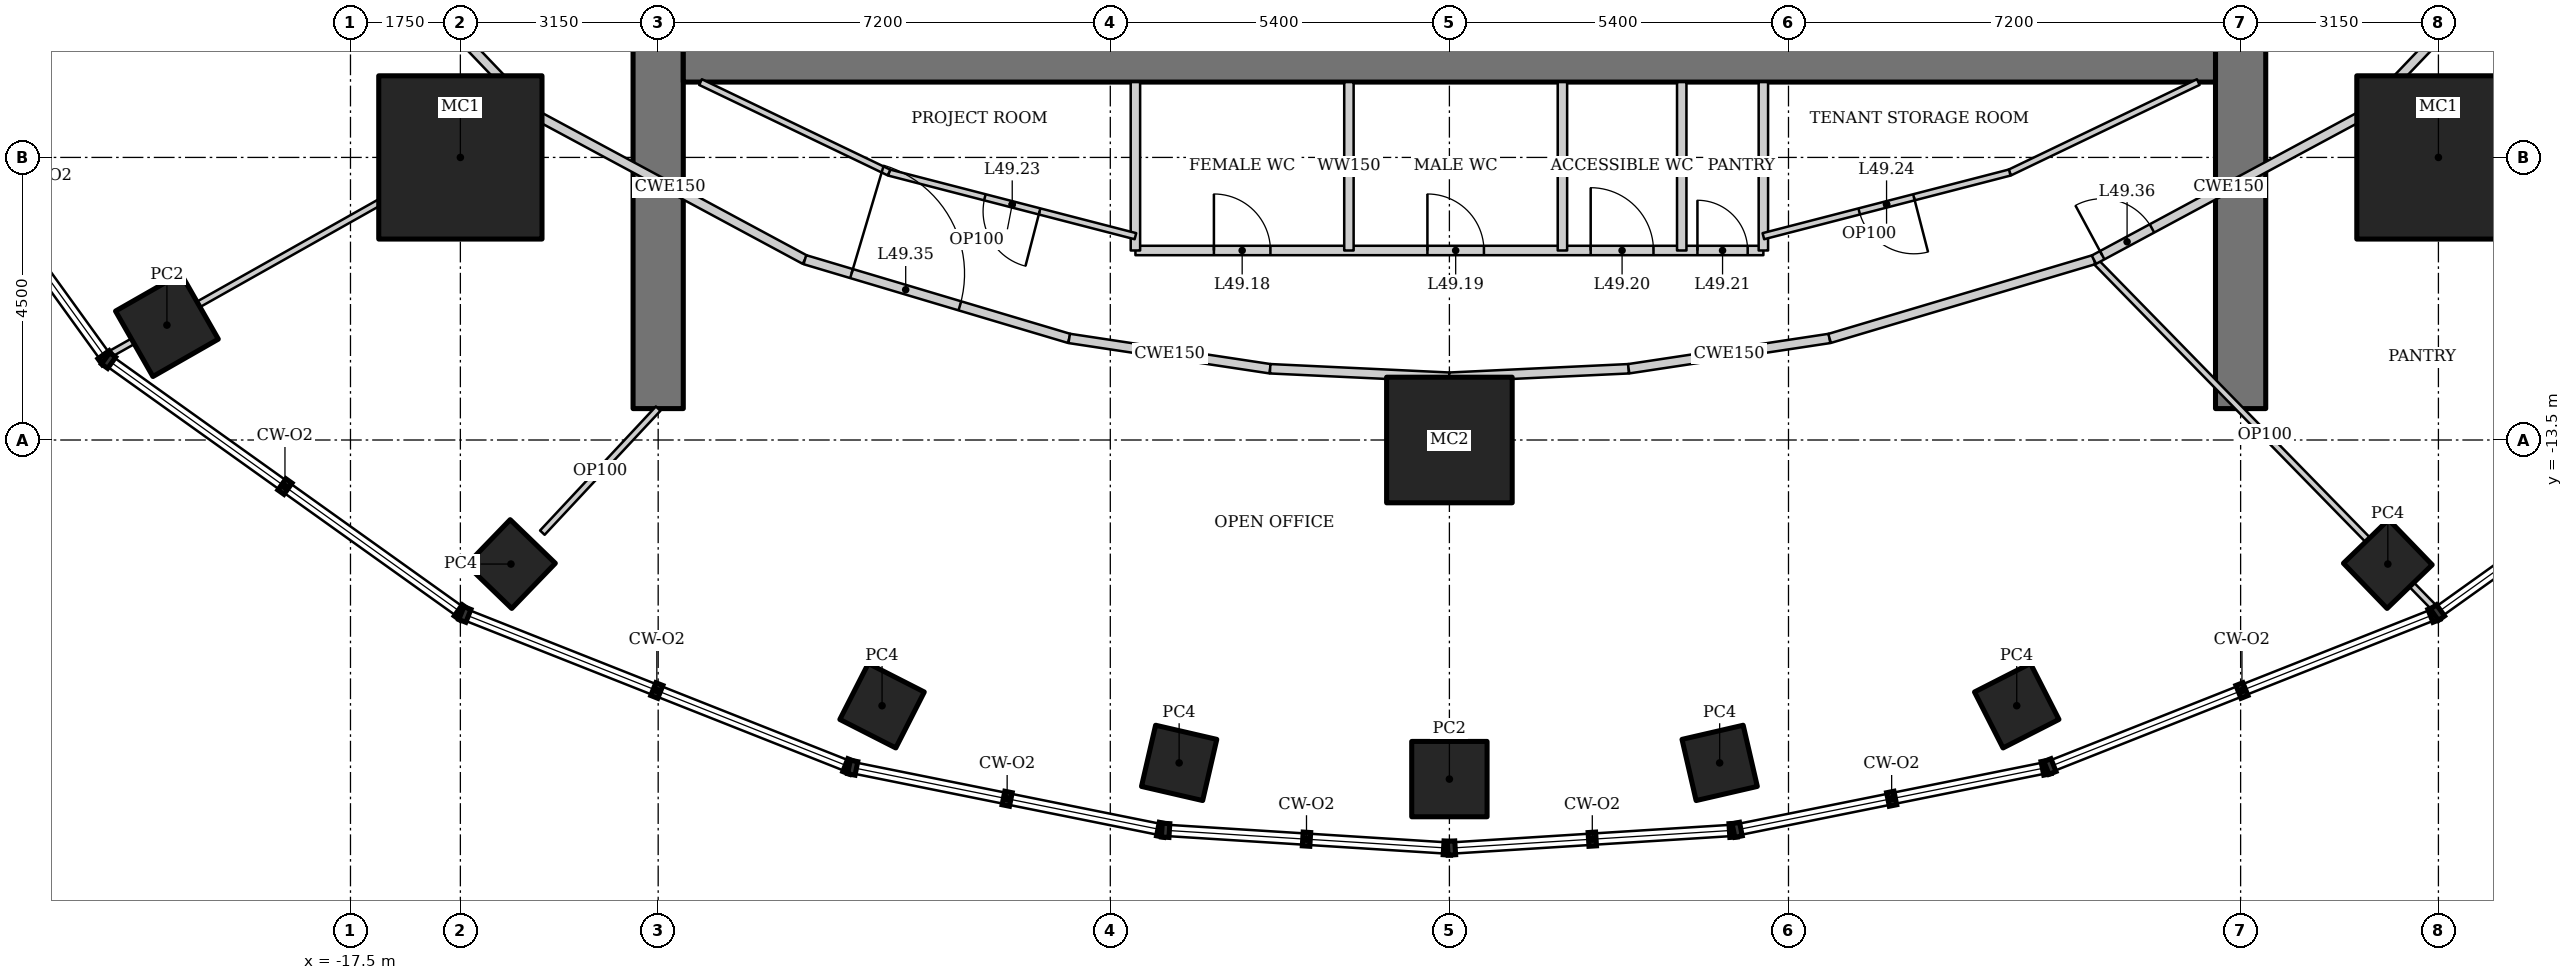
"""IFC4 building model, lengths in metres.
Left out: names, types, materials, properties, quantities, classifications, styles, units other than length and angle.
Written with IfcOpenShell. Run it as: python <this file> out.ifc"""

import sys

from ifc_helpers import new_model, si_unit, direction, frame, frame_2d, origin, origin_2d, place, context, subcontext, project, spatial, rectangle, hollow_rectangle, extrude, element, fill, save


model = new_model("IFC4")
c1 = context("Model", 3, precision=1e-05, world=origin(), true_north=direction((0.0, 1.0)))
c2 = subcontext(c1, "Body", "Model", "MODEL_VIEW")
j1 = project(units=[si_unit("LENGTHUNIT", "METRE"), si_unit("PLANEANGLEUNIT", "RADIAN")], contexts=[c1])
p1 = place(None, origin())
s1 = spatial("IfcSite", under=j1, at=p1, CompositionType="ELEMENT")
p2 = place(p1, origin())
s2 = spatial("IfcBuilding", under=s1, at=p2, CompositionType="ELEMENT")
p3 = place(p2, frame((0.0, 0.0, 211.6)))
s3 = spatial("IfcBuildingStorey", under=s2, at=p3, CompositionType="ELEMENT", Elevation=211.6)
p4 = place(p3, frame((-15.75, -9.0, 0.0), z_axis=(0.0, 0.0, 1.0), x_axis=(1.0, 0.0, 0.0)))
e1 = element("IfcColumn", 1, at=p4, inside=s3, PredefinedType="COLUMN", context=c2, shape_type="SweptSolid", body=[
    extrude(hollow_rectangle(XDim=2.6, YDim=2.6, WallThickness=0.13, at=origin_2d()), origin(), (0.0, 0.0, 1.0), 4.2),
])
p5 = place(p3, frame((0.0, -13.5, 0.0), z_axis=(0.0, 0.0, 1.0), x_axis=(1.0, 0.0, 0.0)))
e2 = element("IfcColumn", 2, at=p5, inside=s3, PredefinedType="COLUMN", context=c2, shape_type="SweptSolid", body=[
    extrude(hollow_rectangle(XDim=2.0, YDim=2.0, WallThickness=0.17, at=origin_2d()), origin(), (0.0, 0.0, 1.0), 4.2),
])
p6 = place(p3, frame((15.75, -9.0, 0.0), z_axis=(0.0, 0.0, 1.0), x_axis=(1.0, 0.0, 0.0)))
e3 = element("IfcColumn", 3, at=p6, inside=s3, PredefinedType="COLUMN", context=c2, shape_type="SweptSolid", body=[
    extrude(hollow_rectangle(XDim=2.6, YDim=2.6, WallThickness=0.13, at=origin_2d()), origin(), (0.0, 0.0, 1.0), 4.2),
])
p7 = place(p3, frame((-20.423, -11.67, 0.0), z_axis=(0.0, 0.0, 1.0), x_axis=(0.86824298017, 0.496139221777, 0.0)))
e4 = element("IfcColumn", 4, at=p7, inside=s3, PredefinedType="COLUMN", context=c2, shape_type="SweptSolid", body=[
    extrude(hollow_rectangle(XDim=1.2, YDim=1.2, WallThickness=0.1, at=origin_2d()), origin(), (0.0, 0.0, 1.0), 4.2),
])
for number, where, z_axis, x_axis in (
    (5, (-14.944, -15.475, 0.0), (0.0, 0.0, 1.0), (0.695, 0.719, 0.0)),
    (6, (-9.035, -17.731, 0.0), (0.0, 0.0, 1.0), (0.454, 0.891, 0.0)),
    (7, (-4.304, -18.642, 0.0), (0.0, 0.0, 1.0), (0.225, 0.974, 0.0)),
):
    element("IfcColumn", number, at=place(p3, frame(where, z_axis=z_axis, x_axis=x_axis)), inside=s3, PredefinedType="COLUMN", context=c2, shape_type="SweptSolid", body=[
        extrude(hollow_rectangle(XDim=1.0, YDim=1.0, WallThickness=0.08, at=origin_2d()), origin(), (0.0, 0.0, 1.0), 4.2),
    ])
p8 = place(p3, frame((0.0, -18.9, 0.0), z_axis=(0.0, 0.0, 1.0), x_axis=(1.0, 0.0, 0.0)))
e8 = element("IfcColumn", 8, at=p8, inside=s3, PredefinedType="COLUMN", context=c2, shape_type="SweptSolid", body=[
    extrude(hollow_rectangle(XDim=1.2, YDim=1.2, WallThickness=0.1, at=origin_2d()), origin(), (0.0, 0.0, 1.0), 4.2),
])
for number, where, z_axis, x_axis in (
    (9, (4.304, -18.642, 0.0), (0.0, 0.0, 1.0), (0.974, 0.225, 0.0)),
    (10, (9.035, -17.731, 0.0), (0.0, 0.0, 1.0), (0.891, 0.454, 0.0)),
    (11, (14.944, -15.475, 0.0), (0.0, 0.0, 1.0), (0.719, 0.695, 0.0)),
):
    element("IfcColumn", number, at=place(p3, frame(where, z_axis=z_axis, x_axis=x_axis)), inside=s3, PredefinedType="COLUMN", context=c2, shape_type="SweptSolid", body=[
        extrude(hollow_rectangle(XDim=1.0, YDim=1.0, WallThickness=0.08, at=origin_2d()), origin(), (0.0, 0.0, 1.0), 4.2),
    ])
p9 = place(p3, frame((12.6, -13.0, 0.0), z_axis=(0.0, 0.0, 1.0), x_axis=(0.0, 1.0, 0.0)))
e12 = element("IfcWall", 12, at=p9, inside=s3, PredefinedType="SHEAR", context=c2, shape_type="SweptSolid", body=[
    extrude(rectangle(XDim=26.0, YDim=0.8, at=frame_2d((13.0, 0.0))), origin(), (0.0, 0.0, 1.0), 4.2),
])
p10 = place(p9, frame((12.1, 0.0, 0.0)))
e13 = element("IfcOpeningElement", 13, at=p10, cuts=e12, PredefinedType="OPENING", context=c2, shape_type="SweptSolid", body=[
    extrude(rectangle(XDim=1.8, YDim=2.1, at=frame_2d((0.9, 1.05))), frame((0.0, 0.41, 0.0), z_axis=(0.0, -1.0, 0.0), x_axis=(1.0, 0.0, 0.0)), (0.0, 0.0, 1.0), 0.82),
])
p11 = place(p3, frame((-12.6, 13.0, 0.0), z_axis=(0.0, 0.0, 1.0), x_axis=(0.0, -1.0, 0.0)))
e14 = element("IfcWall", 14, at=p11, inside=s3, PredefinedType="SHEAR", context=c2, shape_type="SweptSolid", body=[
    extrude(rectangle(XDim=26.0, YDim=0.8, at=frame_2d((13.0, 0.0))), origin(), (0.0, 0.0, 1.0), 4.2),
])
p12 = place(p11, frame((12.1, 0.0, 0.0)))
e15 = element("IfcOpeningElement", 15, at=p12, cuts=e14, PredefinedType="OPENING", context=c2, shape_type="SweptSolid", body=[
    extrude(rectangle(XDim=1.8, YDim=2.1, at=frame_2d((0.9, 1.05))), frame((0.0, 0.41, 0.0), z_axis=(0.0, -1.0, 0.0), x_axis=(1.0, 0.0, 0.0)), (0.0, 0.0, 1.0), 0.82),
])
p13 = place(p3, frame((-12.2, -7.3, 0.0), z_axis=(0.0, 0.0, 1.0), x_axis=(1.0, 0.0, 0.0)))
e16 = element("IfcWall", 16, at=p13, inside=s3, PredefinedType="SHEAR", context=c2, shape_type="SweptSolid", body=[
    extrude(rectangle(XDim=24.4, YDim=1.0, at=frame_2d((12.2, 0.0))), origin(), (0.0, 0.0, 1.0), 4.2),
])
p14 = place(p3, frame((-21.358, -12.15, 0.0), z_axis=(0.0, 0.0, 1.0), x_axis=(0.871273053995, 0.490798599614, 0.0)))
e17 = element("IfcWall", 17, at=p14, inside=s3, PredefinedType="PARTITIONING", context=c2, shape_type="SweptSolid", body=[
    extrude(rectangle(XDim=7.807, YDim=0.1, at=frame_2d((3.904, 0.0))), origin(), (0.0, 0.0, 1.0), 3.524),
])
p15 = place(p3, frame((15.709, -16.199, 0.0), z_axis=(0.0, 0.0, 1.0), x_axis=(-0.699053895446, 0.715068983569, 0.0)))
e18 = element("IfcWall", 18, at=p15, inside=s3, PredefinedType="PARTITIONING", context=c2, shape_type="SweptSolid", body=[
    extrude(rectangle(XDim=7.79, YDim=0.1, at=frame_2d((3.895, 0.0))), origin(), (0.0, 0.0, 1.0), 3.41),
])
p16 = place(p3, frame((21.358, -12.15, 0.0), z_axis=(0.0, 0.0, 1.0), x_axis=(-0.871273053995, 0.490798599614, 0.0)))
e19 = element("IfcWall", 19, at=p16, inside=s3, PredefinedType="PARTITIONING", context=c2, shape_type="SweptSolid", body=[
    extrude(rectangle(XDim=7.807, YDim=0.1, at=frame_2d((3.904, 0.0))), origin(), (0.0, 0.0, 1.0), 3.521),
])
p17 = place(p3, frame((-18.174, -4.531, 0.0), z_axis=(0.0, 0.0, 1.0), x_axis=(0.690768413292, -0.723076067366, 0.0)))
e20 = element("IfcWall", 20, at=p17, inside=s3, PredefinedType="PARTITIONING", context=c2, shape_type="SweptSolid", body=[
    extrude(rectangle(XDim=5.237, YDim=0.15, at=frame_2d((2.618, 0.0))), origin(), (0.0, 0.0, 1.0), 4.05),
])
p18 = place(p17, frame((0.1, 0.0, 0.0)))
e21 = element("IfcOpeningElement", 21, at=p18, cuts=e20, PredefinedType="OPENING", context=c2, shape_type="SweptSolid", body=[
    extrude(rectangle(XDim=1.8, YDim=2.1, at=frame_2d((0.9, 1.05))), frame((0.0, 0.085, 0.0), z_axis=(0.0, -1.0, 0.0), x_axis=(1.0, 0.0, 0.0)), (0.0, 0.0, 1.0), 0.17),
])
p19 = place(p3, frame((-14.556, -8.318, 0.0), z_axis=(0.0, 0.0, 1.0), x_axis=(0.88053863253, -0.47397438393, 0.0)))
e22 = element("IfcWall", 22, at=p19, inside=s3, PredefinedType="PARTITIONING", context=c2, shape_type="SweptSolid", body=[
    extrude(rectangle(XDim=4.875, YDim=0.15, at=frame_2d((2.438, 0.0))), origin(), (0.0, 0.0, 1.0), 4.05),
])
p20 = place(p3, frame((-10.264, -10.628, 0.0), z_axis=(0.0, 0.0, 1.0), x_axis=(0.958384389306, -0.285480931648, 0.0)))
e23 = element("IfcWall", 23, at=p20, inside=s3, PredefinedType="PARTITIONING", context=c2, shape_type="SweptSolid", body=[
    extrude(rectangle(XDim=4.392, YDim=0.15, at=frame_2d((2.196, 0.0))), origin(), (0.0, 0.0, 1.0), 4.05),
])
p21 = place(p20, frame((0.775, 0.0, 0.0)))
e24 = element("IfcOpeningElement", 24, at=p21, cuts=e23, PredefinedType="OPENING", context=c2, shape_type="SweptSolid", body=[
    extrude(rectangle(XDim=1.8, YDim=2.1, at=frame_2d((0.9, 1.05))), frame((0.0, 0.085, 0.0), z_axis=(0.0, -1.0, 0.0), x_axis=(1.0, 0.0, 0.0)), (0.0, 0.0, 1.0), 0.17),
])
p22 = place(p3, frame((-6.054, -11.882, 0.0), z_axis=(0.0, 0.0, 1.0), x_axis=(0.988800347251, -0.149244340852, 0.0)))
e25 = element("IfcWall", 25, at=p22, inside=s3, PredefinedType="PARTITIONING", context=c2, shape_type="SweptSolid", body=[
    extrude(rectangle(XDim=3.236, YDim=0.15, at=frame_2d((1.618, 0.0))), origin(), (0.0, 0.0, 1.0), 4.05),
])
for number, where, z_axis, x_axis in (
    (26, (-2.855, -12.365, 0.0), (0.0, 0.0, 1.0), (0.999, -0.047, 0.0)),
    (27, (0.0, -12.5, 0.0), (0.0, 0.0, 1.0), (0.999, 0.047, 0.0)),
):
    element("IfcWall", number, at=place(p3, frame(where, z_axis=z_axis, x_axis=x_axis)), inside=s3, PredefinedType="PARTITIONING", context=c2, shape_type="SweptSolid", body=[
        extrude(rectangle(XDim=2.858, YDim=0.15, at=frame_2d((1.429, 0.0))), origin(), (0.0, 0.0, 1.0), 4.05),
    ])
p23 = place(p3, frame((2.855, -12.365, 0.0), z_axis=(0.0, 0.0, 1.0), x_axis=(0.988800347251, 0.149244340852, 0.0)))
e28 = element("IfcWall", 28, at=p23, inside=s3, PredefinedType="PARTITIONING", context=c2, shape_type="SweptSolid", body=[
    extrude(rectangle(XDim=3.236, YDim=0.15, at=frame_2d((1.618, 0.0))), origin(), (0.0, 0.0, 1.0), 4.05),
])
p24 = place(p3, frame((6.054, -11.882, 0.0), z_axis=(0.0, 0.0, 1.0), x_axis=(0.958384389306, 0.285480931648, 0.0)))
e29 = element("IfcWall", 29, at=p24, inside=s3, PredefinedType="PARTITIONING", context=c2, shape_type="SweptSolid", body=[
    extrude(rectangle(XDim=4.392, YDim=0.15, at=frame_2d((2.196, 0.0))), origin(), (0.0, 0.0, 1.0), 4.05),
])
p25 = place(p3, frame((10.264, -10.628, 0.0), z_axis=(0.0, 0.0, 1.0), x_axis=(0.88053863253, 0.47397438393, 0.0)))
e30 = element("IfcWall", 30, at=p25, inside=s3, PredefinedType="PARTITIONING", context=c2, shape_type="SweptSolid", body=[
    extrude(rectangle(XDim=4.875, YDim=0.15, at=frame_2d((2.438, 0.0))), origin(), (0.0, 0.0, 1.0), 4.05),
])
p26 = place(p25, frame((0.15, 0.0, 0.0)))
e31 = element("IfcOpeningElement", 31, at=p26, cuts=e30, PredefinedType="OPENING", context=c2, shape_type="SweptSolid", body=[
    extrude(rectangle(XDim=0.9, YDim=2.1, at=frame_2d((0.45, 1.05))), frame((0.0, 0.085, 0.0), z_axis=(0.0, -1.0, 0.0), x_axis=(1.0, 0.0, 0.0)), (0.0, 0.0, 1.0), 0.17),
])
p27 = place(p3, frame((14.556, -8.318, 0.0), z_axis=(0.0, 0.0, 1.0), x_axis=(0.690768413292, 0.723076067366, 0.0)))
e32 = element("IfcWall", 32, at=p27, inside=s3, PredefinedType="PARTITIONING", context=c2, shape_type="SweptSolid", body=[
    extrude(rectangle(XDim=5.237, YDim=0.15, at=frame_2d((2.618, 0.0))), origin(), (0.0, 0.0, 1.0), 4.05),
])
p28 = place(p27, frame((4.187, 0.0, 0.0)))
e33 = element("IfcOpeningElement", 33, at=p28, cuts=e32, PredefinedType="OPENING", context=c2, shape_type="SweptSolid", body=[
    extrude(rectangle(XDim=0.9, YDim=2.1, at=frame_2d((0.45, 1.05))), frame((0.0, 0.085, 0.0), z_axis=(0.0, -1.0, 0.0), x_axis=(1.0, 0.0, 0.0)), (0.0, 0.0, 1.0), 0.17),
])
p29 = place(p3, frame((-5.0, -10.482, 0.0), z_axis=(0.0, 0.0, 1.0), x_axis=(1.0, 0.0, 0.0)))
e34 = element("IfcWall", 34, at=p29, inside=s3, PredefinedType="SOLIDWALL", context=c2, shape_type="SweptSolid", body=[
    extrude(rectangle(XDim=10.0, YDim=0.15, at=frame_2d((5.0, 0.0))), origin(), (0.0, 0.0, 1.0), 4.05),
])
p30 = place(p29, frame((1.25, 0.0, 0.0)))
e35 = element("IfcOpeningElement", 35, at=p30, cuts=e34, PredefinedType="OPENING", context=c2, shape_type="SweptSolid", body=[
    extrude(rectangle(XDim=0.9, YDim=2.1, at=frame_2d((0.45, 1.05))), frame((0.0, 0.085, 0.0), z_axis=(0.0, -1.0, 0.0), x_axis=(1.0, 0.0, 0.0)), (0.0, 0.0, 1.0), 0.17),
])
p31 = place(p29, frame((4.65, 0.0, 0.0)))
e36 = element("IfcOpeningElement", 36, at=p31, cuts=e34, PredefinedType="OPENING", context=c2, shape_type="SweptSolid", body=[
    extrude(rectangle(XDim=0.9, YDim=2.1, at=frame_2d((0.45, 1.05))), frame((0.0, 0.085, 0.0), z_axis=(0.0, -1.0, 0.0), x_axis=(1.0, 0.0, 0.0)), (0.0, 0.0, 1.0), 0.17),
])
p32 = place(p29, frame((7.25, 0.0, 0.0)))
e37 = element("IfcOpeningElement", 37, at=p32, cuts=e34, PredefinedType="OPENING", context=c2, shape_type="SweptSolid", body=[
    extrude(rectangle(XDim=1.0, YDim=2.1, at=frame_2d((0.5, 1.05))), frame((0.0, 0.085, 0.0), z_axis=(0.0, -1.0, 0.0), x_axis=(1.0, 0.0, 0.0)), (0.0, 0.0, 1.0), 0.17),
])
p33 = place(p29, frame((8.95, 0.0, 0.0)))
e38 = element("IfcOpeningElement", 38, at=p33, cuts=e34, PredefinedType="OPENING", context=c2, shape_type="SweptSolid", body=[
    extrude(rectangle(XDim=0.8, YDim=2.1, at=frame_2d((0.4, 1.05))), frame((0.0, 0.085, 0.0), z_axis=(0.0, -1.0, 0.0), x_axis=(1.0, 0.0, 0.0)), (0.0, 0.0, 1.0), 0.17),
])
for number, where, z_axis, x_axis in (
    (39, (-5.0, -7.8, 0.0), (0.0, 0.0, 1.0), (0.0, -1.0, 0.0)),
    (40, (5.0, -7.8, 0.0), (0.0, 0.0, 1.0), (0.0, -1.0, 0.0)),
    (41, (-1.6, -7.8, 0.0), (0.0, 0.0, 1.0), (0.0, -1.0, 0.0)),
):
    element("IfcWall", number, at=place(p3, frame(where, z_axis=z_axis, x_axis=x_axis)), inside=s3, PredefinedType="SOLIDWALL", context=c2, shape_type="SweptSolid", body=[
        extrude(rectangle(XDim=2.682, YDim=0.15, at=frame_2d((1.341, 0.0))), origin(), (0.0, 0.0, 1.0), 4.05),
    ])
p34 = place(p3, frame((1.8, -7.8, 0.0), z_axis=(0.0, 0.0, 1.0), x_axis=(0.0, -1.0, 0.0)))
e42 = element("IfcWall", 42, at=p34, inside=s3, PredefinedType="SOLIDWALL", context=c2, shape_type="SweptSolid", body=[
    extrude(rectangle(XDim=2.682, YDim=0.15, at=frame_2d((1.341, 0.0))), origin(), (0.0, 0.0, 1.0), 3.293),
])
p35 = place(p3, frame((3.7, -7.8, 0.0), z_axis=(0.0, 0.0, 1.0), x_axis=(0.0, -1.0, 0.0)))
e43 = element("IfcWall", 43, at=p35, inside=s3, PredefinedType="SOLIDWALL", context=c2, shape_type="SweptSolid", body=[
    extrude(rectangle(XDim=2.682, YDim=0.15, at=frame_2d((1.341, 0.0))), origin(), (0.0, 0.0, 1.0), 4.05),
])
p36 = place(p3, frame((-5.0, -10.254, 0.0), z_axis=(0.0, 0.0, 1.0), x_axis=(-0.968224167198, 0.250083910027, 0.0)))
e44 = element("IfcWall", 44, at=p36, inside=s3, PredefinedType="PARTITIONING", context=c2, shape_type="SweptSolid", body=[
    extrude(rectangle(XDim=4.052, YDim=0.1, at=frame_2d((2.026, 0.0))), origin(), (0.0, 0.0, 1.0), 4.05),
])
p37 = place(p36, frame((1.576, 0.0, 0.0)))
e45 = element("IfcOpeningElement", 45, at=p37, cuts=e44, PredefinedType="OPENING", context=c2, shape_type="SweptSolid", body=[
    extrude(rectangle(XDim=0.9, YDim=2.1, at=frame_2d((0.45, 1.05))), frame((0.0, 0.06, 0.0), z_axis=(0.0, -1.0, 0.0), x_axis=(1.0, 0.0, 0.0)), (0.0, 0.0, 1.0), 0.12),
])
for number, where, z_axis, x_axis in (
    (46, (-8.924, -9.241, 0.0), (0.0, 0.0, 1.0), (-0.902, 0.433, 0.0)),
    (47, (11.926, -7.8, 0.0), (0.0, 0.0, 1.0), (-0.902, -0.433, 0.0)),
):
    element("IfcWall", number, at=place(p3, frame(where, z_axis=z_axis, x_axis=x_axis)), inside=s3, PredefinedType="PARTITIONING", context=c2, shape_type="SweptSolid", body=[
        extrude(rectangle(XDim=3.33, YDim=0.1, at=frame_2d((1.665, 0.0))), origin(), (0.0, 0.0, 1.0), 4.05),
    ])
p38 = place(p3, frame((8.924, -9.241, 0.0), z_axis=(0.0, 0.0, 1.0), x_axis=(-0.968224167198, -0.250083910027, 0.0)))
e48 = element("IfcWall", 48, at=p38, inside=s3, PredefinedType="PARTITIONING", context=c2, shape_type="SweptSolid", body=[
    extrude(rectangle(XDim=4.052, YDim=0.1, at=frame_2d((2.026, 0.0))), origin(), (0.0, 0.0, 1.0), 4.05),
])
p39 = place(p38, frame((1.576, 0.0, 0.0)))
e49 = element("IfcOpeningElement", 49, at=p39, cuts=e48, PredefinedType="OPENING", context=c2, shape_type="SweptSolid", body=[
    extrude(rectangle(XDim=0.9, YDim=2.1, at=frame_2d((0.45, 1.05))), frame((0.0, 0.06, 0.0), z_axis=(0.0, -1.0, 0.0), x_axis=(1.0, 0.0, 0.0)), (0.0, 0.0, 1.0), 0.12),
])
p40 = place(p3, frame((-12.6, -13.0, 0.0), z_axis=(0.0, 0.0, 1.0), x_axis=(-0.682434118301, -0.730947107648, 0.0)))
e50 = element("IfcWall", 50, at=p40, inside=s3, PredefinedType="PARTITIONING", context=c2, shape_type="SweptSolid", body=[
    extrude(rectangle(XDim=2.702, YDim=0.1, at=frame_2d((1.351, 0.0))), origin(), (0.0, 0.0, 1.0), 3.41),
])
p41 = place(p30, origin())
e51 = element("IfcDoor", 51, at=p41, inside=s3, OperationType="SINGLE_SWING_LEFT", PredefinedType="DOOR", context=c2, shape_type="SweptSolid", body=[
    extrude(rectangle(XDim=0.9, YDim=2.1, at=frame_2d((0.45, 1.05))), frame((0.0, 0.025, 0.0), z_axis=(0.0, -1.0, 0.0), x_axis=(1.0, 0.0, 0.0)), (0.0, 0.0, 1.0), 0.05),
])
fill(e35, e51)
p42 = place(p31, origin())
e52 = element("IfcDoor", 52, at=p42, inside=s3, OperationType="SINGLE_SWING_LEFT", PredefinedType="DOOR", context=c2, shape_type="SweptSolid", body=[
    extrude(rectangle(XDim=0.9, YDim=2.1, at=frame_2d((0.45, 1.05))), frame((0.0, 0.025, 0.0), z_axis=(0.0, -1.0, 0.0), x_axis=(1.0, 0.0, 0.0)), (0.0, 0.0, 1.0), 0.05),
])
fill(e36, e52)
p43 = place(p32, origin())
e53 = element("IfcDoor", 53, at=p43, inside=s3, OperationType="SINGLE_SWING_LEFT", PredefinedType="DOOR", context=c2, shape_type="SweptSolid", body=[
    extrude(rectangle(XDim=1.0, YDim=2.1, at=frame_2d((0.5, 1.05))), frame((0.0, 0.025, 0.0), z_axis=(0.0, -1.0, 0.0), x_axis=(1.0, 0.0, 0.0)), (0.0, 0.0, 1.0), 0.05),
])
fill(e37, e53)
p44 = place(p33, origin())
e54 = element("IfcDoor", 54, at=p44, inside=s3, OperationType="SINGLE_SWING_LEFT", PredefinedType="DOOR", context=c2, shape_type="SweptSolid", body=[
    extrude(rectangle(XDim=0.8, YDim=2.1, at=frame_2d((0.4, 1.05))), frame((0.0, 0.025, 0.0), z_axis=(0.0, -1.0, 0.0), x_axis=(1.0, 0.0, 0.0)), (0.0, 0.0, 1.0), 0.05),
])
fill(e38, e54)
p45 = place(p37, origin())
e55 = element("IfcDoor", 55, at=p45, inside=s3, OperationType="SINGLE_SWING_LEFT", PredefinedType="DOOR", context=c2, shape_type="SweptSolid", body=[
    extrude(rectangle(XDim=0.9, YDim=2.1, at=frame_2d((0.45, 1.05))), frame((0.0, 0.025, 0.0), z_axis=(0.0, -1.0, 0.0), x_axis=(1.0, 0.0, 0.0)), (0.0, 0.0, 1.0), 0.05),
])
fill(e45, e55)
p46 = place(p39, origin())
e56 = element("IfcDoor", 56, at=p46, inside=s3, OperationType="SINGLE_SWING_LEFT", PredefinedType="DOOR", context=c2, shape_type="SweptSolid", body=[
    extrude(rectangle(XDim=0.9, YDim=2.1, at=frame_2d((0.45, 1.05))), frame((0.0, 0.025, 0.0), z_axis=(0.0, -1.0, 0.0), x_axis=(1.0, 0.0, 0.0)), (0.0, 0.0, 1.0), 0.05),
])
fill(e49, e56)
p47 = place(p21, origin())
e57 = element("IfcDoor", 57, at=p47, inside=s3, OperationType="DOUBLE_DOOR_DOUBLE_SWING", PredefinedType="DOOR", context=c2, shape_type="SweptSolid", body=[
    extrude(rectangle(XDim=1.8, YDim=2.1, at=frame_2d((0.9, 1.05))), frame((0.0, 0.025, 0.0), z_axis=(0.0, -1.0, 0.0), x_axis=(1.0, 0.0, 0.0)), (0.0, 0.0, 1.0), 0.05),
])
fill(e24, e57)
p48 = place(p26, origin())
e58 = element("IfcDoor", 58, at=p48, inside=s3, OperationType="SINGLE_SWING_LEFT", PredefinedType="DOOR", context=c2, shape_type="SweptSolid", body=[
    extrude(rectangle(XDim=0.9, YDim=2.1, at=frame_2d((0.45, 1.05))), frame((0.0, 0.025, 0.0), z_axis=(0.0, -1.0, 0.0), x_axis=(1.0, 0.0, 0.0)), (0.0, 0.0, 1.0), 0.05),
])
fill(e31, e58)
save(model, sys.argv[1])
